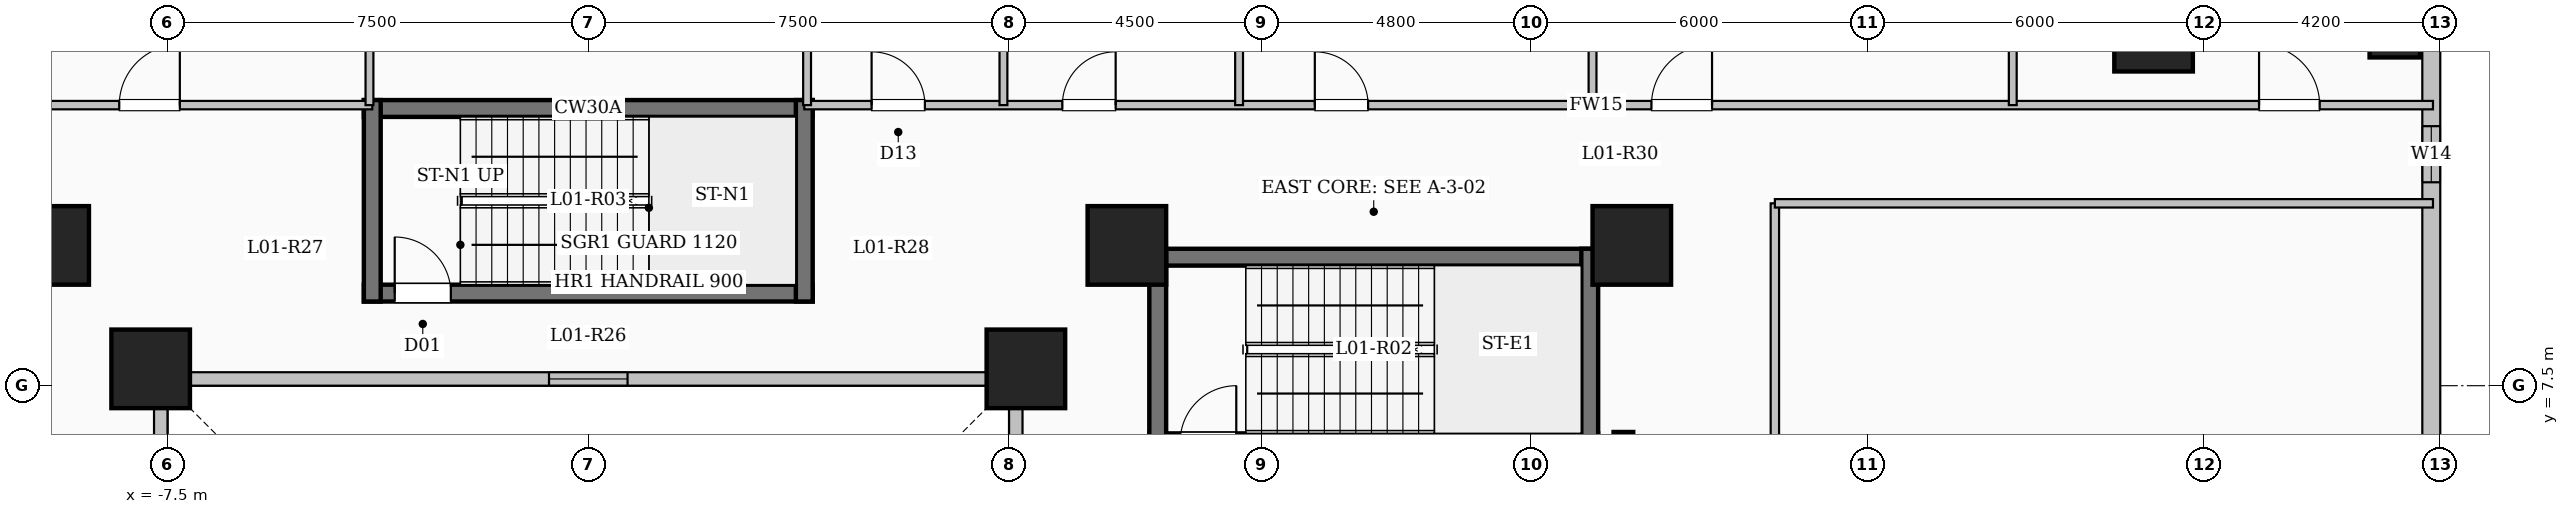
"""IFC4 building model, lengths in metres.
Left out: names, types, materials, properties, quantities, classifications, styles, units other than length and angle.
Written with IfcOpenShell. Run it as: python <this file> out.ifc"""

import sys

from ifc_helpers import new_model, si_unit, direction, frame, frame_2d, origin, origin_2d, place, context, subcontext, project, spatial, rectangle, extrude, element, fill, save


model = new_model("IFC4")
c1 = context("Model", 3, precision=1e-05, world=origin(), true_north=direction((0.0, 1.0)))
c2 = subcontext(c1, "Body", "Model", "MODEL_VIEW")
j1 = project(units=[si_unit("LENGTHUNIT", "METRE"), si_unit("PLANEANGLEUNIT", "RADIAN")], contexts=[c1])
p1 = place(None, origin())
s1 = spatial("IfcSite", under=j1, at=p1, CompositionType="ELEMENT")
p2 = place(p1, origin())
s2 = spatial("IfcBuilding", under=s1, at=p2, CompositionType="ELEMENT")
p3 = place(p2, frame((0.0, 0.0, 5.4)))
s3 = spatial("IfcBuildingStorey", under=s2, at=p3, CompositionType="ELEMENT", Elevation=5.4)
for number, where, z_axis, x_axis in (
    (1, (-7.8, 7.8, 0.0), (0.0, 0.0, 1.0), (1.0, 0.0, 0.0)),
    (2, (7.8, 7.8, 0.0), (0.0, 0.0, 1.0), (1.0, 0.0, 0.0)),
    (3, (-9.6, 10.0, 0.0), (0.0, 0.0, 1.0), (1.0, 0.0, 0.0)),
    (4, (9.6, 10.0, 0.0), (0.0, 0.0, 1.0), (1.0, 0.0, 0.0)),
    (5, (18.6, 10.0, 0.0), (0.0, 0.0, 1.0), (1.0, 0.0, 0.0)),
):
    element("IfcColumn", number, at=place(p3, frame(where, z_axis=z_axis, x_axis=x_axis)), inside=s3, PredefinedType="COLUMN", context=c2, shape_type="SweptSolid", body=[
        extrude(rectangle(XDim=1.4, YDim=1.4, at=origin_2d()), origin(), (0.0, 0.0, 1.0), 4.5),
    ])
p4 = place(p3, frame((32.2, 13.8, 0.0), z_axis=(0.0, 0.0, 1.0), x_axis=(1.0, 0.0, 0.0)))
e6 = element("IfcColumn", 6, at=p4, inside=s3, PredefinedType="COLUMN", context=c2, shape_type="SweptSolid", body=[
    extrude(rectangle(XDim=0.9, YDim=0.9, at=origin_2d()), origin(), (0.0, 0.0, 1.0), 4.28),
])
p5 = place(p3, frame((27.9, 13.8, 0.0), z_axis=(0.0, 0.0, 1.0), x_axis=(1.0, 0.0, 0.0)))
e7 = element("IfcColumn", 7, at=p5, inside=s3, PredefinedType="COLUMN", context=c2, shape_type="SweptSolid", body=[
    extrude(rectangle(XDim=1.4, YDim=1.4, at=origin_2d()), origin(), (0.0, 0.0, 1.0), 4.5),
])
p6 = place(p3, frame((7.62, -7.62, 0.0), z_axis=(0.0, 0.0, 1.0), x_axis=(0.0, 1.0, 0.0)))
e8 = element("IfcWall", 8, at=p6, inside=s3, PredefinedType="SOLIDWALL", context=c2, shape_type="SweptSolid", body=[
    extrude(rectangle(XDim=15.24, YDim=0.24, at=frame_2d((7.62, 0.0))), origin(), (0.0, 0.0, 1.0), 4.2),
])
p7 = place(p6, frame((6.92, 0.0, 0.95)))
e9 = element("IfcOpeningElement", 9, at=p7, cuts=e8, PredefinedType="OPENING", context=c2, shape_type="SweptSolid", body=[
    extrude(rectangle(XDim=1.4, YDim=1.5, at=frame_2d((0.7, 0.75))), frame((0.0, 0.13, 0.0), z_axis=(0.0, -1.0, 0.0), x_axis=(1.0, 0.0, 0.0)), (0.0, 0.0, 1.0), 0.26),
])
p8 = place(p3, frame((7.62, 7.62, 0.0), z_axis=(0.0, 0.0, 1.0), x_axis=(-1.0, 0.0, 0.0)))
e10 = element("IfcWall", 10, at=p8, inside=s3, PredefinedType="SOLIDWALL", context=c2, shape_type="SweptSolid", body=[
    extrude(rectangle(XDim=15.24, YDim=0.24, at=frame_2d((7.62, 0.0))), origin(), (0.0, 0.0, 1.0), 4.2),
])
p9 = place(p8, frame((6.92, 0.0, 0.95)))
e11 = element("IfcOpeningElement", 11, at=p9, cuts=e10, PredefinedType="OPENING", context=c2, shape_type="SweptSolid", body=[
    extrude(rectangle(XDim=1.4, YDim=1.5, at=frame_2d((0.7, 0.75))), frame((0.0, 0.13, 0.0), z_axis=(0.0, -1.0, 0.0), x_axis=(1.0, 0.0, 0.0)), (0.0, 0.0, 1.0), 0.26),
])
p10 = place(p3, frame((-7.62, 7.62, 0.0), z_axis=(0.0, 0.0, 1.0), x_axis=(0.0, -1.0, 0.0)))
e12 = element("IfcWall", 12, at=p10, inside=s3, PredefinedType="SOLIDWALL", context=c2, shape_type="SweptSolid", body=[
    extrude(rectangle(XDim=15.24, YDim=0.24, at=frame_2d((7.62, 0.0))), origin(), (0.0, 0.0, 1.0), 4.2),
])
p11 = place(p10, frame((6.92, 0.0, 0.95)))
e13 = element("IfcOpeningElement", 13, at=p11, cuts=e12, PredefinedType="OPENING", context=c2, shape_type="SweptSolid", body=[
    extrude(rectangle(XDim=1.4, YDim=1.5, at=frame_2d((0.7, 0.75))), frame((0.0, 0.13, 0.0), z_axis=(0.0, -1.0, 0.0), x_axis=(1.0, 0.0, 0.0)), (0.0, 0.0, 1.0), 0.26),
])
p12 = place(p3, frame((32.85, 29.85, 0.0), z_axis=(0.0, 0.0, 1.0), x_axis=(0.0, -1.0, 0.0)))
e14 = element("IfcWall", 14, at=p12, inside=s3, PredefinedType="SOLIDWALL", context=c2, shape_type="SweptSolid", body=[
    extrude(rectangle(XDim=59.7, YDim=0.32, at=frame_2d((29.85, 0.0))), origin(), (0.0, 0.0, 1.0), 4.2),
])
p13 = place(p12, frame((7.6, 0.0, 0.9)))
e15 = element("IfcOpeningElement", 15, at=p13, cuts=e14, PredefinedType="OPENING", context=c2, shape_type="SweptSolid", body=[
    extrude(rectangle(XDim=2.1, YDim=2.0, at=frame_2d((1.05, 1.0))), frame((0.0, 0.17, 0.0), z_axis=(0.0, -1.0, 0.0), x_axis=(1.0, 0.0, 0.0)), (0.0, 0.0, 1.0), 0.34),
])
p14 = place(p12, frame((17.725, 0.0, 0.95)))
e16 = element("IfcOpeningElement", 16, at=p14, cuts=e14, PredefinedType="OPENING", context=c2, shape_type="SweptSolid", body=[
    extrude(rectangle(XDim=1.0, YDim=1.5, at=frame_2d((0.5, 0.75))), frame((0.0, 0.17, 0.0), z_axis=(0.0, -1.0, 0.0), x_axis=(1.0, 0.0, 0.0)), (0.0, 0.0, 1.0), 0.34),
])
p15 = place(p12, frame((27.05, 0.0, 0.9)))
e17 = element("IfcOpeningElement", 17, at=p15, cuts=e14, PredefinedType="OPENING", context=c2, shape_type="SweptSolid", body=[
    extrude(rectangle(XDim=2.1, YDim=2.0, at=frame_2d((1.05, 1.0))), frame((0.0, 0.17, 0.0), z_axis=(0.0, -1.0, 0.0), x_axis=(1.0, 0.0, 0.0)), (0.0, 0.0, 1.0), 0.34),
])
p16 = place(p12, frame((37.758, 0.0, 0.9)))
e18 = element("IfcOpeningElement", 18, at=p16, cuts=e14, PredefinedType="OPENING", context=c2, shape_type="SweptSolid", body=[
    extrude(rectangle(XDim=1.7, YDim=1.9, at=frame_2d((0.85, 0.95))), frame((0.0, 0.17, 0.0), z_axis=(0.0, -1.0, 0.0), x_axis=(1.0, 0.0, 0.0)), (0.0, 0.0, 1.0), 0.34),
])
p17 = place(p3, frame((10.0, 9.79, 0.0), z_axis=(0.0, 0.0, 1.0), x_axis=(1.0, 0.0, 0.0)))
e19 = element("IfcWall", 19, at=p17, inside=s3, PredefinedType="SHEAR", context=c2, shape_type="SweptSolid", body=[
    extrude(rectangle(XDim=8.0, YDim=0.3, at=frame_2d((4.0, 0.0))), origin(), (0.0, 0.0, 1.0), 4.5),
])
p18 = place(p3, frame((10.0, 6.5, 0.0), z_axis=(0.0, 0.0, 1.0), x_axis=(1.0, 0.0, 0.0)))
e20 = element("IfcWall", 20, at=p18, inside=s3, PredefinedType="SHEAR", context=c2, shape_type="SweptSolid", body=[
    extrude(rectangle(XDim=8.0, YDim=0.3, at=frame_2d((4.0, 0.0))), origin(), (0.0, 0.0, 1.0), 4.5),
])
p19 = place(p18, frame((0.55, 0.0, 0.0)))
e21 = element("IfcOpeningElement", 21, at=p19, cuts=e20, PredefinedType="OPENING", context=c2, shape_type="SweptSolid", body=[
    extrude(rectangle(XDim=1.0, YDim=2.15, at=frame_2d((0.5, 1.075))), frame((0.0, 0.16, 0.0), z_axis=(0.0, -1.0, 0.0), x_axis=(1.0, 0.0, 0.0)), (0.0, 0.0, 1.0), 0.32),
])
for number, where, z_axis, x_axis in (
    (22, (10.15, 6.35, 0.0), (0.0, 0.0, 1.0), (0.0, 1.0, 0.0)),
    (23, (17.85, 6.35, 0.0), (0.0, 0.0, 1.0), (0.0, 1.0, 0.0)),
):
    element("IfcWall", number, at=place(p3, frame(where, z_axis=z_axis, x_axis=x_axis)), inside=s3, PredefinedType="SHEAR", context=c2, shape_type="SweptSolid", body=[
        extrude(rectangle(XDim=3.59, YDim=0.3, at=frame_2d((1.795, 0.0))), origin(), (0.0, 0.0, 1.0), 4.5),
    ])
p20 = place(p3, frame((-4.0, 12.44, 0.0), z_axis=(0.0, 0.0, 1.0), x_axis=(1.0, 0.0, 0.0)))
e24 = element("IfcWall", 24, at=p20, inside=s3, PredefinedType="SHEAR", context=c2, shape_type="SweptSolid", body=[
    extrude(rectangle(XDim=8.0, YDim=0.3, at=frame_2d((4.0, 0.0))), origin(), (0.0, 0.0, 1.0), 4.5),
])
p21 = place(p3, frame((-4.0, 9.15, 0.0), z_axis=(0.0, 0.0, 1.0), x_axis=(1.0, 0.0, 0.0)))
e25 = element("IfcWall", 25, at=p21, inside=s3, PredefinedType="SHEAR", context=c2, shape_type="SweptSolid", body=[
    extrude(rectangle(XDim=8.0, YDim=0.3, at=frame_2d((4.0, 0.0))), origin(), (0.0, 0.0, 1.0), 4.5),
])
p22 = place(p21, frame((0.55, 0.0, 0.0)))
e26 = element("IfcOpeningElement", 26, at=p22, cuts=e25, PredefinedType="OPENING", context=c2, shape_type="SweptSolid", body=[
    extrude(rectangle(XDim=1.0, YDim=2.15, at=frame_2d((0.5, 1.075))), frame((0.0, 0.16, 0.0), z_axis=(0.0, -1.0, 0.0), x_axis=(1.0, 0.0, 0.0)), (0.0, 0.0, 1.0), 0.32),
])
for number, where, z_axis, x_axis in (
    (27, (-3.85, 9.0, 0.0), (0.0, 0.0, 1.0), (0.0, 1.0, 0.0)),
    (28, (3.85, 9.0, 0.0), (0.0, 0.0, 1.0), (0.0, 1.0, 0.0)),
):
    element("IfcWall", number, at=place(p3, frame(where, z_axis=z_axis, x_axis=x_axis)), inside=s3, PredefinedType="SHEAR", context=c2, shape_type="SweptSolid", body=[
        extrude(rectangle(XDim=3.59, YDim=0.3, at=frame_2d((1.795, 0.0))), origin(), (0.0, 0.0, 1.0), 4.5),
    ])
p23 = place(p3, frame((18.45, -7.375, 0.0), z_axis=(0.0, 0.0, 1.0), x_axis=(0.0, 1.0, 0.0)))
e29 = element("IfcWall", 29, at=p23, inside=s3, PredefinedType="SHEAR", context=c2, shape_type="SweptSolid", body=[
    extrude(rectangle(XDim=14.05, YDim=0.35, at=frame_2d((7.025, 0.0))), origin(), (0.0, 0.0, 1.0), 4.5),
])
p24 = place(p3, frame((-28.88, 12.5, 0.0), z_axis=(0.0, 0.0, 1.0), x_axis=(1.0, 0.0, 0.0)))
e30 = element("IfcWall", 30, at=p24, inside=s3, PredefinedType="PARTITIONING", context=c2, shape_type="SweptSolid", body=[
    extrude(rectangle(XDim=25.03, YDim=0.15, at=frame_2d((12.515, 0.0))), origin(), (0.0, 0.0, 1.0), 4.2),
])
p25 = place(p24, frame((2.65, 0.0, 0.0)))
e31 = element("IfcOpeningElement", 31, at=p25, cuts=e30, PredefinedType="OPENING", context=c2, shape_type="SweptSolid", body=[
    extrude(rectangle(XDim=1.2, YDim=2.15, at=frame_2d((0.6, 1.075))), frame((0.0, 0.085, 0.0), z_axis=(0.0, -1.0, 0.0), x_axis=(1.0, 0.0, 0.0)), (0.0, 0.0, 1.0), 0.17),
])
p26 = place(p24, frame((14.68, 0.0, 0.0)))
e32 = element("IfcOpeningElement", 32, at=p26, cuts=e30, PredefinedType="OPENING", context=c2, shape_type="SweptSolid", body=[
    extrude(rectangle(XDim=1.08, YDim=2.15, at=frame_2d((0.54, 1.075))), frame((0.0, 0.085, 0.0), z_axis=(0.0, -1.0, 0.0), x_axis=(1.0, 0.0, 0.0)), (0.0, 0.0, 1.0), 0.17),
])
p27 = place(p24, frame((20.52, 0.0, 0.0)))
e33 = element("IfcOpeningElement", 33, at=p27, cuts=e30, PredefinedType="OPENING", context=c2, shape_type="SweptSolid", body=[
    extrude(rectangle(XDim=1.08, YDim=2.15, at=frame_2d((0.54, 1.075))), frame((0.0, 0.085, 0.0), z_axis=(0.0, -1.0, 0.0), x_axis=(1.0, 0.0, 0.0)), (0.0, 0.0, 1.0), 0.17),
])
p28 = place(p3, frame((3.85, 12.5, 0.0), z_axis=(0.0, 0.0, 1.0), x_axis=(1.0, 0.0, 0.0)))
e34 = element("IfcWall", 34, at=p28, inside=s3, PredefinedType="PARTITIONING", context=c2, shape_type="SweptSolid", body=[
    extrude(rectangle(XDim=29.03, YDim=0.15, at=frame_2d((14.515, 0.0))), origin(), (0.0, 0.0, 1.0), 4.2),
])
p29 = place(p28, frame((1.2, 0.0, 0.0)))
e35 = element("IfcOpeningElement", 35, at=p29, cuts=e34, PredefinedType="OPENING", context=c2, shape_type="SweptSolid", body=[
    extrude(rectangle(XDim=0.95, YDim=2.15, at=frame_2d((0.475, 1.075))), frame((0.0, 0.085, 0.0), z_axis=(0.0, -1.0, 0.0), x_axis=(1.0, 0.0, 0.0)), (0.0, 0.0, 1.0), 0.17),
])
p30 = place(p28, frame((4.6, 0.0, 0.0)))
e36 = element("IfcOpeningElement", 36, at=p30, cuts=e34, PredefinedType="OPENING", context=c2, shape_type="SweptSolid", body=[
    extrude(rectangle(XDim=0.95, YDim=2.15, at=frame_2d((0.475, 1.075))), frame((0.0, 0.085, 0.0), z_axis=(0.0, -1.0, 0.0), x_axis=(1.0, 0.0, 0.0)), (0.0, 0.0, 1.0), 0.17),
])
p31 = place(p28, frame((9.1, 0.0, 0.0)))
e37 = element("IfcOpeningElement", 37, at=p31, cuts=e34, PredefinedType="OPENING", context=c2, shape_type="SweptSolid", body=[
    extrude(rectangle(XDim=0.95, YDim=2.15, at=frame_2d((0.475, 1.075))), frame((0.0, 0.085, 0.0), z_axis=(0.0, -1.0, 0.0), x_axis=(1.0, 0.0, 0.0)), (0.0, 0.0, 1.0), 0.17),
])
p32 = place(p28, frame((15.1, 0.0, 0.0)))
e38 = element("IfcOpeningElement", 38, at=p32, cuts=e34, PredefinedType="OPENING", context=c2, shape_type="SweptSolid", body=[
    extrude(rectangle(XDim=1.08, YDim=2.15, at=frame_2d((0.54, 1.075))), frame((0.0, 0.085, 0.0), z_axis=(0.0, -1.0, 0.0), x_axis=(1.0, 0.0, 0.0)), (0.0, 0.0, 1.0), 0.17),
])
p33 = place(p28, frame((25.93, 0.0, 0.0)))
e39 = element("IfcOpeningElement", 39, at=p33, cuts=e34, PredefinedType="OPENING", context=c2, shape_type="SweptSolid", body=[
    extrude(rectangle(XDim=1.08, YDim=2.15, at=frame_2d((0.54, 1.075))), frame((0.0, 0.085, 0.0), z_axis=(0.0, -1.0, 0.0), x_axis=(1.0, 0.0, 0.0)), (0.0, 0.0, 1.0), 0.17),
])
p34 = place(p3, frame((21.15, -7.25, 0.0), z_axis=(0.0, 0.0, 1.0), x_axis=(0.0, 1.0, 0.0)))
e40 = element("IfcWall", 40, at=p34, inside=s3, PredefinedType="PARTITIONING", context=c2, shape_type="SweptSolid", body=[
    extrude(rectangle(XDim=18.0, YDim=0.15, at=frame_2d((9.0, 0.0))), origin(), (0.0, 0.0, 1.0), 4.2),
])
for number, where, z_axis, x_axis in (
    (41, (-3.9, 12.5, 0.0), (0.0, 0.0, 1.0), (0.0, 1.0, 0.0)),
    (42, (3.9, 12.5, 0.0), (0.0, 0.0, 1.0), (0.0, 1.0, 0.0)),
    (43, (7.4, 12.5, 0.0), (0.0, 0.0, 1.0), (0.0, 1.0, 0.0)),
    (44, (11.6, 12.5, 0.0), (0.0, 0.0, 1.0), (0.0, 1.0, 0.0)),
):
    element("IfcWall", number, at=place(p3, frame(where, z_axis=z_axis, x_axis=x_axis)), inside=s3, PredefinedType="PARTITIONING", context=c2, shape_type="SweptSolid", body=[
        extrude(rectangle(XDim=17.38, YDim=0.14, at=frame_2d((8.69, 0.0))), origin(), (0.0, 0.0, 1.0), 4.2),
    ])
p35 = place(p3, frame((17.9, 12.5, 0.0), z_axis=(0.0, 0.0, 1.0), x_axis=(0.0, 1.0, 0.0)))
e45 = element("IfcWall", 45, at=p35, inside=s3, PredefinedType="PARTITIONING", context=c2, shape_type="SweptSolid", body=[
    extrude(rectangle(XDim=17.38, YDim=0.14, at=frame_2d((8.69, 0.0))), origin(), (0.0, 0.0, 1.0), 3.385),
])
p36 = place(p3, frame((25.39, 12.5, 0.0), z_axis=(0.0, 0.0, 1.0), x_axis=(0.0, 1.0, 0.0)))
e46 = element("IfcWall", 46, at=p36, inside=s3, PredefinedType="PARTITIONING", context=c2, shape_type="SweptSolid", body=[
    extrude(rectangle(XDim=17.38, YDim=0.14, at=frame_2d((8.69, 0.0))), origin(), (0.0, 0.0, 1.0), 4.2),
])
p37 = place(p3, frame((21.15, 10.75, 0.0), z_axis=(0.0, 0.0, 1.0), x_axis=(1.0, 0.0, 0.0)))
e47 = element("IfcWall", 47, at=p37, inside=s3, PredefinedType="PARTITIONING", context=c2, shape_type="SweptSolid", body=[
    extrude(rectangle(XDim=11.73, YDim=0.15, at=frame_2d((5.865, 0.0))), origin(), (0.0, 0.0, 1.0), 4.2),
])
p38 = place(p9, origin())
e48 = element("IfcWindow", 48, at=p38, inside=s3, PartitioningType="SINGLE_PANEL", PredefinedType="WINDOW", context=c2, shape_type="SweptSolid", body=[
    extrude(rectangle(XDim=1.4, YDim=1.5, at=frame_2d((0.7, 0.75))), frame((0.0, 0.03, 0.0), z_axis=(0.0, -1.0, 0.0), x_axis=(1.0, 0.0, 0.0)), (0.0, 0.0, 1.0), 0.06),
])
fill(e11, e48)
p39 = place(p14, origin())
e49 = element("IfcWindow", 49, at=p39, inside=s3, PartitioningType="SINGLE_PANEL", PredefinedType="WINDOW", context=c2, shape_type="SweptSolid", body=[
    extrude(rectangle(XDim=1.0, YDim=1.5, at=frame_2d((0.5, 0.75))), frame((0.0, 0.03, 0.0), z_axis=(0.0, -1.0, 0.0), x_axis=(1.0, 0.0, 0.0)), (0.0, 0.0, 1.0), 0.06),
])
fill(e16, e49)
p40 = place(p22, origin())
e50 = element("IfcDoor", 50, at=p40, inside=s3, OperationType="SINGLE_SWING_LEFT", PredefinedType="DOOR", context=c2, shape_type="SweptSolid", body=[
    extrude(rectangle(XDim=1.0, YDim=2.15, at=frame_2d((0.5, 1.075))), frame((0.0, 0.025, 0.0), z_axis=(0.0, -1.0, 0.0), x_axis=(1.0, 0.0, 0.0)), (0.0, 0.0, 1.0), 0.05),
])
fill(e26, e50)
p41 = place(p27, origin())
e51 = element("IfcDoor", 51, at=p41, inside=s3, OperationType="SINGLE_SWING_RIGHT", PredefinedType="DOOR", context=c2, shape_type="SweptSolid", body=[
    extrude(rectangle(XDim=1.08, YDim=2.15, at=frame_2d((0.54, 1.075))), frame((0.0, 0.025, 0.0), z_axis=(0.0, -1.0, 0.0), x_axis=(1.0, 0.0, 0.0)), (0.0, 0.0, 1.0), 0.05),
])
fill(e33, e51)
p42 = place(p29, origin())
e52 = element("IfcDoor", 52, at=p42, inside=s3, OperationType="SINGLE_SWING_LEFT", PredefinedType="DOOR", context=c2, shape_type="SweptSolid", body=[
    extrude(rectangle(XDim=0.95, YDim=2.15, at=frame_2d((0.475, 1.075))), frame((0.0, 0.025, 0.0), z_axis=(0.0, -1.0, 0.0), x_axis=(1.0, 0.0, 0.0)), (0.0, 0.0, 1.0), 0.05),
])
fill(e35, e52)
p43 = place(p30, origin())
e53 = element("IfcDoor", 53, at=p43, inside=s3, OperationType="SINGLE_SWING_RIGHT", PredefinedType="DOOR", context=c2, shape_type="SweptSolid", body=[
    extrude(rectangle(XDim=0.95, YDim=2.15, at=frame_2d((0.475, 1.075))), frame((0.0, 0.025, 0.0), z_axis=(0.0, -1.0, 0.0), x_axis=(1.0, 0.0, 0.0)), (0.0, 0.0, 1.0), 0.05),
])
fill(e36, e53)
p44 = place(p31, origin())
e54 = element("IfcDoor", 54, at=p44, inside=s3, OperationType="SINGLE_SWING_LEFT", PredefinedType="DOOR", context=c2, shape_type="SweptSolid", body=[
    extrude(rectangle(XDim=0.95, YDim=2.15, at=frame_2d((0.475, 1.075))), frame((0.0, 0.025, 0.0), z_axis=(0.0, -1.0, 0.0), x_axis=(1.0, 0.0, 0.0)), (0.0, 0.0, 1.0), 0.05),
])
fill(e37, e54)
p45 = place(p32, origin())
e55 = element("IfcDoor", 55, at=p45, inside=s3, OperationType="SINGLE_SWING_RIGHT", PredefinedType="DOOR", context=c2, shape_type="SweptSolid", body=[
    extrude(rectangle(XDim=1.08, YDim=2.15, at=frame_2d((0.54, 1.075))), frame((0.0, 0.025, 0.0), z_axis=(0.0, -1.0, 0.0), x_axis=(1.0, 0.0, 0.0)), (0.0, 0.0, 1.0), 0.05),
])
fill(e38, e55)
p46 = place(p33, origin())
e56 = element("IfcDoor", 56, at=p46, inside=s3, OperationType="SINGLE_SWING_LEFT", PredefinedType="DOOR", context=c2, shape_type="SweptSolid", body=[
    extrude(rectangle(XDim=1.08, YDim=2.15, at=frame_2d((0.54, 1.075))), frame((0.0, 0.025, 0.0), z_axis=(0.0, -1.0, 0.0), x_axis=(1.0, 0.0, 0.0)), (0.0, 0.0, 1.0), 0.05),
])
fill(e39, e56)
save(model, sys.argv[1])
